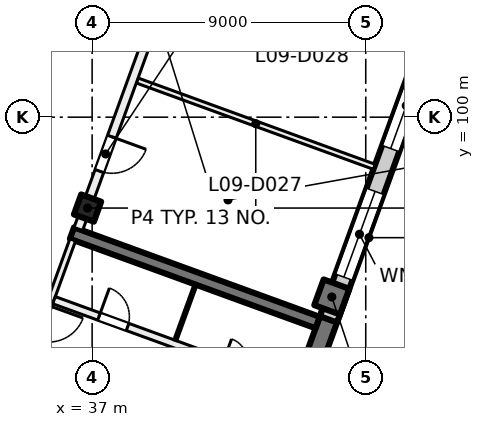
"""IFC4 building model, lengths in metres.
Left out: names, types, materials, properties, quantities, classifications, styles, units other than length and angle.
Written with IfcOpenShell. Run it as: python <this file> out.ifc"""

import sys

from ifc_helpers import new_model, si_unit, direction, frame, frame_2d, origin, origin_2d, place, context, subcontext, project, spatial, rectangle, extrude, element, fill, save


model = new_model("IFC4")
c1 = context("Model", 3, precision=1e-05, world=origin(), true_north=direction((0.0, 1.0)))
c2 = subcontext(c1, "Body", "Model", "MODEL_VIEW")
j1 = project(units=[si_unit("LENGTHUNIT", "METRE"), si_unit("PLANEANGLEUNIT", "RADIAN")], contexts=[c1])
p1 = place(None, origin())
s1 = spatial("IfcSite", under=j1, at=p1, CompositionType="ELEMENT")
p2 = place(p1, origin())
s2 = spatial("IfcBuilding", under=s1, at=p2, CompositionType="ELEMENT")
p3 = place(p2, frame((0.0, 0.0, 43.5)))
s3 = spatial("IfcBuildingStorey", under=s2, at=p3, CompositionType="ELEMENT", Elevation=43.5)
p4 = place(p3, frame((36.849, 97.011, 0.0), z_axis=(0.0, 0.0, 1.0), x_axis=(-0.342020143326, -0.939692620786, 0.0)))
e1 = element("IfcColumn", 1, at=p4, inside=s3, PredefinedType="COLUMN", context=c2, shape_type="SweptSolid", body=[
    extrude(rectangle(XDim=0.7, YDim=0.7, at=origin_2d()), origin(), (0.0, 0.0, 1.0), 4.0),
])
p5 = place(p3, frame((44.884, 94.087, 0.0), z_axis=(0.0, 0.0, 1.0), x_axis=(-0.342020143326, -0.939692620786, 0.0)))
e2 = element("IfcColumn", 2, at=p5, inside=s3, PredefinedType="COLUMN", context=c2, shape_type="SweptSolid", body=[
    extrude(rectangle(XDim=0.9, YDim=0.9, at=origin_2d()), origin(), (0.0, 0.0, 1.0), 4.0),
])
p6 = place(p3, frame((41.827, 85.249, 0.0), z_axis=(0.0, 0.0, 1.0), x_axis=(0.342016162452, 0.939694069696, 0.0)))
e3 = element("IfcWall", 3, at=p6, inside=s3, PredefinedType="SHEAR", context=c2, shape_type="SweptSolid", body=[
    extrude(rectangle(XDim=8.9, YDim=0.6, at=frame_2d((4.45, 0.0))), origin(), (0.0, 0.0, 1.0), 4.0),
])
p7 = place(p3, frame((44.418, 93.245, 0.0), z_axis=(0.0, 0.0, 1.0), x_axis=(-0.93969060187, 0.342025690201, 0.0)))
e4 = element("IfcWall", 4, at=p7, inside=s3, PredefinedType="SHEAR", context=c2, shape_type="SweptSolid", body=[
    extrude(rectangle(XDim=8.6, YDim=0.4, at=frame_2d((4.3, 0.0))), origin(), (0.0, 0.0, 1.0), 4.0),
])
p8 = place(p3, frame((52.212, 113.783, 0.0), z_axis=(0.0, 0.0, 1.0), x_axis=(-0.34202521188, -0.939690775968, 0.0)))
e5 = element("IfcWall", 5, at=p8, inside=s3, PredefinedType="SOLIDWALL", context=c2, shape_type="SweptSolid", body=[
    extrude(rectangle(XDim=21.745, YDim=0.6, at=frame_2d((10.873, 0.0))), origin(), (0.0, 0.0, 1.0), 3.625),
])
p9 = place(p8, frame((4.365, 0.0, 0.0)))
e6 = element("IfcOpeningElement", 6, at=p9, cuts=e5, PredefinedType="OPENING", context=c2, shape_type="SweptSolid", body=[
    extrude(rectangle(XDim=1.8, YDim=2.4, at=frame_2d((0.9, 1.2))), frame((0.0, 0.31, 0.0), z_axis=(0.0, -1.0, 0.0), x_axis=(1.0, 0.0, 0.0)), (0.0, 0.0, 1.0), 0.62),
])
p10 = place(p8, frame((8.265, 0.0, 0.9)))
e7 = element("IfcOpeningElement", 7, at=p10, cuts=e5, PredefinedType="OPENING", context=c2, shape_type="SweptSolid", body=[
    extrude(rectangle(XDim=3.0, YDim=2.4, at=frame_2d((1.5, 1.2))), frame((0.0, 0.31, 0.0), z_axis=(0.0, -1.0, 0.0), x_axis=(1.0, 0.0, 0.0)), (0.0, 0.0, 1.0), 0.62),
])
p11 = place(p8, frame((12.765, 0.0, 0.9)))
e8 = element("IfcOpeningElement", 8, at=p11, cuts=e5, PredefinedType="OPENING", context=c2, shape_type="SweptSolid", body=[
    extrude(rectangle(XDim=3.0, YDim=2.4, at=frame_2d((1.5, 1.2))), frame((0.0, 0.31, 0.0), z_axis=(0.0, -1.0, 0.0), x_axis=(1.0, 0.0, 0.0)), (0.0, 0.0, 1.0), 0.62),
])
p12 = place(p8, frame((17.265, 0.0, 0.9)))
e9 = element("IfcOpeningElement", 9, at=p12, cuts=e5, PredefinedType="OPENING", context=c2, shape_type="SweptSolid", body=[
    extrude(rectangle(XDim=3.0, YDim=2.4, at=frame_2d((1.5, 1.2))), frame((0.0, 0.31, 0.0), z_axis=(0.0, -1.0, 0.0), x_axis=(1.0, 0.0, 0.0)), (0.0, 0.0, 1.0), 0.62),
])
p13 = place(p3, frame((24.666, 100.669, 0.0), z_axis=(0.0, 0.0, 1.0), x_axis=(0.34201964167, 0.939692803373, 0.0)))
e10 = element("IfcWall", 10, at=p13, inside=s3, PredefinedType="SOLIDWALL", context=c2, shape_type="SweptSolid", body=[
    extrude(rectangle(XDim=32.884, YDim=0.6, at=frame_2d((16.442, 0.0))), origin(), (0.0, 0.0, 1.0), 3.625),
])
p14 = place(p13, frame((1.48, 0.0, 0.9)))
e11 = element("IfcOpeningElement", 11, at=p14, cuts=e10, PredefinedType="OPENING", context=c2, shape_type="SweptSolid", body=[
    extrude(rectangle(XDim=3.0, YDim=2.4, at=frame_2d((1.5, 1.2))), frame((0.0, 0.31, 0.0), z_axis=(0.0, -1.0, 0.0), x_axis=(1.0, 0.0, 0.0)), (0.0, 0.0, 1.0), 0.62),
])
p15 = place(p13, frame((5.98, 0.0, 0.9)))
e12 = element("IfcOpeningElement", 12, at=p15, cuts=e10, PredefinedType="OPENING", context=c2, shape_type="SweptSolid", body=[
    extrude(rectangle(XDim=3.0, YDim=2.4, at=frame_2d((1.5, 1.2))), frame((0.0, 0.31, 0.0), z_axis=(0.0, -1.0, 0.0), x_axis=(1.0, 0.0, 0.0)), (0.0, 0.0, 1.0), 0.62),
])
p16 = place(p13, frame((10.48, 0.0, 0.9)))
e13 = element("IfcOpeningElement", 13, at=p16, cuts=e10, PredefinedType="OPENING", context=c2, shape_type="SweptSolid", body=[
    extrude(rectangle(XDim=3.0, YDim=2.4, at=frame_2d((1.5, 1.2))), frame((0.0, 0.31, 0.0), z_axis=(0.0, -1.0, 0.0), x_axis=(1.0, 0.0, 0.0)), (0.0, 0.0, 1.0), 0.62),
])
p17 = place(p13, frame((14.98, 0.0, 0.9)))
e14 = element("IfcOpeningElement", 14, at=p17, cuts=e10, PredefinedType="OPENING", context=c2, shape_type="SweptSolid", body=[
    extrude(rectangle(XDim=3.0, YDim=2.4, at=frame_2d((1.5, 1.2))), frame((0.0, 0.31, 0.0), z_axis=(0.0, -1.0, 0.0), x_axis=(1.0, 0.0, 0.0)), (0.0, 0.0, 1.0), 0.62),
])
p18 = place(p13, frame((20.08, 0.0, 0.0)))
e15 = element("IfcOpeningElement", 15, at=p18, cuts=e10, PredefinedType="OPENING", context=c2, shape_type="SweptSolid", body=[
    extrude(rectangle(XDim=1.8, YDim=2.4, at=frame_2d((0.9, 1.2))), frame((0.0, 0.31, 0.0), z_axis=(0.0, -1.0, 0.0), x_axis=(1.0, 0.0, 0.0)), (0.0, 0.0, 1.0), 0.62),
])
p19 = place(p13, frame((23.98, 0.0, 0.9)))
e16 = element("IfcOpeningElement", 16, at=p19, cuts=e10, PredefinedType="OPENING", context=c2, shape_type="SweptSolid", body=[
    extrude(rectangle(XDim=3.0, YDim=2.4, at=frame_2d((1.5, 1.2))), frame((0.0, 0.31, 0.0), z_axis=(0.0, -1.0, 0.0), x_axis=(1.0, 0.0, 0.0)), (0.0, 0.0, 1.0), 0.62),
])
p20 = place(p13, frame((28.48, 0.0, 0.9)))
e17 = element("IfcOpeningElement", 17, at=p20, cuts=e10, PredefinedType="OPENING", context=c2, shape_type="SweptSolid", body=[
    extrude(rectangle(XDim=3.0, YDim=2.4, at=frame_2d((1.5, 1.2))), frame((0.0, 0.31, 0.0), z_axis=(0.0, -1.0, 0.0), x_axis=(1.0, 0.0, 0.0)), (0.0, 0.0, 1.0), 0.62),
])
p21 = place(p3, frame((36.362, 95.964, 0.0), z_axis=(0.0, 0.0, 1.0), x_axis=(-0.341995824804, -0.939701471648, 0.0)))
e18 = element("IfcWall", 18, at=p21, inside=s3, PredefinedType="PARTITIONING", context=c2, shape_type="SweptSolid", body=[
    extrude(rectangle(XDim=3.8, YDim=0.2, at=frame_2d((1.9, 0.0))), origin(), (0.0, 0.0, 1.0), 3.625),
])
p22 = place(p21, frame((2.3, 0.0, 0.0)))
e19 = element("IfcOpeningElement", 19, at=p22, cuts=e18, PredefinedType="OPENING", context=c2, shape_type="SweptSolid", body=[
    extrude(rectangle(XDim=1.2, YDim=2.1, at=frame_2d((0.6, 1.05))), frame((0.0, 0.11, 0.0), z_axis=(0.0, -1.0, 0.0), x_axis=(1.0, 0.0, 0.0)), (0.0, 0.0, 1.0), 0.22),
])
p23 = place(p3, frame((35.19, 92.453, 0.0), z_axis=(0.0, 0.0, 1.0), x_axis=(0.939691552312, -0.342023078919, 0.0)))
e20 = element("IfcWall", 20, at=p23, inside=s3, PredefinedType="PARTITIONING", context=c2, shape_type="SweptSolid", body=[
    extrude(rectangle(XDim=8.4, YDim=0.2, at=frame_2d((4.2, 0.0))), origin(), (0.0, 0.0, 1.0), 3.625),
])
p24 = place(p23, frame((5.25, 0.0, 0.0)))
e21 = element("IfcOpeningElement", 21, at=p24, cuts=e20, PredefinedType="OPENING", context=c2, shape_type="SweptSolid", body=[
    extrude(rectangle(XDim=1.5, YDim=2.1, at=frame_2d((0.75, 1.05))), frame((0.0, 0.11, 0.0), z_axis=(0.0, -1.0, 0.0), x_axis=(1.0, 0.0, 0.0)), (0.0, 0.0, 1.0), 0.22),
])
p25 = place(p3, frame((35.746, 93.98, 0.0), z_axis=(0.0, 0.0, 1.0), x_axis=(0.939691552312, -0.342023078919, 0.0)))
e22 = element("IfcWall", 22, at=p25, inside=s3, PredefinedType="PARTITIONING", context=c2, shape_type="SweptSolid", body=[
    extrude(rectangle(XDim=8.4, YDim=0.25, at=frame_2d((4.2, 0.0))), origin(), (0.0, 0.0, 1.0), 3.625),
])
p26 = place(p25, frame((1.575, 0.0, 0.0)))
e23 = element("IfcOpeningElement", 23, at=p26, cuts=e22, PredefinedType="OPENING", context=c2, shape_type="SweptSolid", body=[
    extrude(rectangle(XDim=1.0, YDim=2.1, at=frame_2d((0.5, 1.05))), frame((0.0, 0.135, 0.0), z_axis=(0.0, -1.0, 0.0), x_axis=(1.0, 0.0, 0.0)), (0.0, 0.0, 1.0), 0.27),
])
p27 = place(p25, frame((5.925, 0.0, 0.0)))
e24 = element("IfcOpeningElement", 24, at=p27, cuts=e22, PredefinedType="OPENING", context=c2, shape_type="SweptSolid", body=[
    extrude(rectangle(XDim=0.8, YDim=2.1, at=frame_2d((0.4, 1.05))), frame((0.0, 0.135, 0.0), z_axis=(0.0, -1.0, 0.0), x_axis=(1.0, 0.0, 0.0)), (0.0, 0.0, 1.0), 0.27),
])
p28 = place(p3, frame((40.403, 94.494, 0.0), z_axis=(0.0, 0.0, 1.0), x_axis=(-0.342064742067, -0.939676386973, 0.0)))
e25 = element("IfcWall", 25, at=p28, inside=s3, PredefinedType="PARTITIONING", context=c2, shape_type="SweptSolid", body=[
    extrude(rectangle(XDim=1.95, YDim=0.1, at=frame_2d((0.975, 0.0))), origin(), (0.0, 0.0, 1.0), 3.625),
])
p29 = place(p3, frame((32.881, 97.657, 0.0), z_axis=(0.0, 0.0, 1.0), x_axis=(0.342017360004, 0.939693633828, 0.0)))
e26 = element("IfcWall", 26, at=p29, inside=s3, PredefinedType="PARTITIONING", context=c2, shape_type="SweptSolid", body=[
    extrude(rectangle(XDim=34.516, YDim=0.3, at=frame_2d((17.258, 0.0))), origin(), (0.0, 0.0, 1.0), 3.625),
])
p30 = place(p29, frame((12.975, 0.0, 0.0)))
e27 = element("IfcOpeningElement", 27, at=p30, cuts=e26, PredefinedType="OPENING", context=c2, shape_type="SweptSolid", body=[
    extrude(rectangle(XDim=1.8, YDim=2.1, at=frame_2d((0.9, 1.05))), frame((0.0, 0.16, 0.0), z_axis=(0.0, -1.0, 0.0), x_axis=(1.0, 0.0, 0.0)), (0.0, 0.0, 1.0), 0.32),
])
p31 = place(p3, frame((38.482, 101.206, 0.0), z_axis=(0.0, 0.0, 1.0), x_axis=(0.939687752599, -0.342033518263, 0.0)))
e28 = element("IfcWall", 28, at=p31, inside=s3, PredefinedType="PARTITIONING", context=c2, shape_type="SweptSolid", body=[
    extrude(rectangle(XDim=8.301, YDim=0.175, at=frame_2d((4.15, 0.0))), origin(), (0.0, 0.0, 1.0), 3.625),
])
p32 = place(p3, frame((47.314, 125.909, 0.0), z_axis=(0.0, 0.0, 1.0), x_axis=(-0.342010770371, -0.939696032209, 0.0)))
e29 = element("IfcWall", 29, at=p32, inside=s3, PredefinedType="PARTITIONING", context=c2, shape_type="SweptSolid", body=[
    extrude(rectangle(XDim=31.485, YDim=0.3, at=frame_2d((15.742, 0.0))), origin(), (0.0, 0.0, 1.0), 3.625),
])
p33 = place(p32, frame((28.259, 0.0, 0.0)))
e30 = element("IfcOpeningElement", 30, at=p33, cuts=e29, PredefinedType="OPENING", context=c2, shape_type="SweptSolid", body=[
    extrude(rectangle(XDim=1.2, YDim=2.1, at=frame_2d((0.6, 1.05))), frame((0.0, 0.16, 0.0), z_axis=(0.0, -1.0, 0.0), x_axis=(1.0, 0.0, 0.0)), (0.0, 0.0, 1.0), 0.32),
])
p34 = place(p32, frame((23.484, 0.0, 0.0)))
e31 = element("IfcOpeningElement", 31, at=p34, cuts=e29, PredefinedType="OPENING", context=c2, shape_type="SweptSolid", body=[
    extrude(rectangle(XDim=1.0, YDim=2.1, at=frame_2d((0.5, 1.05))), frame((0.0, 0.16, 0.0), z_axis=(0.0, -1.0, 0.0), x_axis=(1.0, 0.0, 0.0)), (0.0, 0.0, 1.0), 0.32),
])
p35 = place(p32, frame((18.984, 0.0, 0.0)))
e32 = element("IfcOpeningElement", 32, at=p35, cuts=e29, PredefinedType="OPENING", context=c2, shape_type="SweptSolid", body=[
    extrude(rectangle(XDim=1.0, YDim=2.1, at=frame_2d((0.5, 1.05))), frame((0.0, 0.16, 0.0), z_axis=(0.0, -1.0, 0.0), x_axis=(1.0, 0.0, 0.0)), (0.0, 0.0, 1.0), 0.32),
])
p36 = place(p32, frame((14.385, 0.0, 0.0)))
e33 = element("IfcOpeningElement", 33, at=p36, cuts=e29, PredefinedType="OPENING", context=c2, shape_type="SweptSolid", body=[
    extrude(rectangle(XDim=1.2, YDim=2.1, at=frame_2d((0.6, 1.05))), frame((0.0, 0.16, 0.0), z_axis=(0.0, -1.0, 0.0), x_axis=(1.0, 0.0, 0.0)), (0.0, 0.0, 1.0), 0.32),
])
p37 = place(p32, frame((9.885, 0.0, 0.0)))
e34 = element("IfcOpeningElement", 34, at=p37, cuts=e29, PredefinedType="OPENING", context=c2, shape_type="SweptSolid", body=[
    extrude(rectangle(XDim=1.2, YDim=2.1, at=frame_2d((0.6, 1.05))), frame((0.0, 0.16, 0.0), z_axis=(0.0, -1.0, 0.0), x_axis=(1.0, 0.0, 0.0)), (0.0, 0.0, 1.0), 0.32),
])
p38 = place(p32, frame((5.384, 0.0, 0.0)))
e35 = element("IfcOpeningElement", 35, at=p38, cuts=e29, PredefinedType="OPENING", context=c2, shape_type="SweptSolid", body=[
    extrude(rectangle(XDim=1.2, YDim=2.1, at=frame_2d((0.6, 1.05))), frame((0.0, 0.16, 0.0), z_axis=(0.0, -1.0, 0.0), x_axis=(1.0, 0.0, 0.0)), (0.0, 0.0, 1.0), 0.32),
])
p39 = place(p11, origin())
e36 = element("IfcWindow", 36, at=p39, inside=s3, PartitioningType="SINGLE_PANEL", PredefinedType="WINDOW", context=c2, shape_type="SweptSolid", body=[
    extrude(rectangle(XDim=3.0, YDim=2.4, at=frame_2d((1.5, 1.2))), frame((0.0, 0.03, 0.0), z_axis=(0.0, -1.0, 0.0), x_axis=(1.0, 0.0, 0.0)), (0.0, 0.0, 1.0), 0.06),
])
fill(e8, e36)
p40 = place(p12, origin())
e37 = element("IfcWindow", 37, at=p40, inside=s3, PartitioningType="SINGLE_PANEL", PredefinedType="WINDOW", context=c2, shape_type="SweptSolid", body=[
    extrude(rectangle(XDim=3.0, YDim=2.4, at=frame_2d((1.5, 1.2))), frame((0.0, 0.03, 0.0), z_axis=(0.0, -1.0, 0.0), x_axis=(1.0, 0.0, 0.0)), (0.0, 0.0, 1.0), 0.06),
])
fill(e9, e37)
p41 = place(p26, origin())
e38 = element("IfcDoor", 38, at=p41, inside=s3, OperationType="SINGLE_SWING_RIGHT", PredefinedType="DOOR", context=c2, shape_type="SweptSolid", body=[
    extrude(rectangle(XDim=1.0, YDim=2.1, at=frame_2d((0.5, 1.05))), frame((0.0, 0.025, 0.0), z_axis=(0.0, -1.0, 0.0), x_axis=(1.0, 0.0, 0.0)), (0.0, 0.0, 1.0), 0.05),
])
fill(e23, e38)
p42 = place(p33, origin())
e39 = element("IfcDoor", 39, at=p42, inside=s3, OperationType="DOUBLE_DOOR_SINGLE_SWING", PredefinedType="DOOR", context=c2, shape_type="SweptSolid", body=[
    extrude(rectangle(XDim=1.2, YDim=2.1, at=frame_2d((0.6, 1.05))), frame((0.0, 0.025, 0.0), z_axis=(0.0, -1.0, 0.0), x_axis=(1.0, 0.0, 0.0)), (0.0, 0.0, 1.0), 0.05),
])
fill(e30, e39)
save(model, sys.argv[1])
